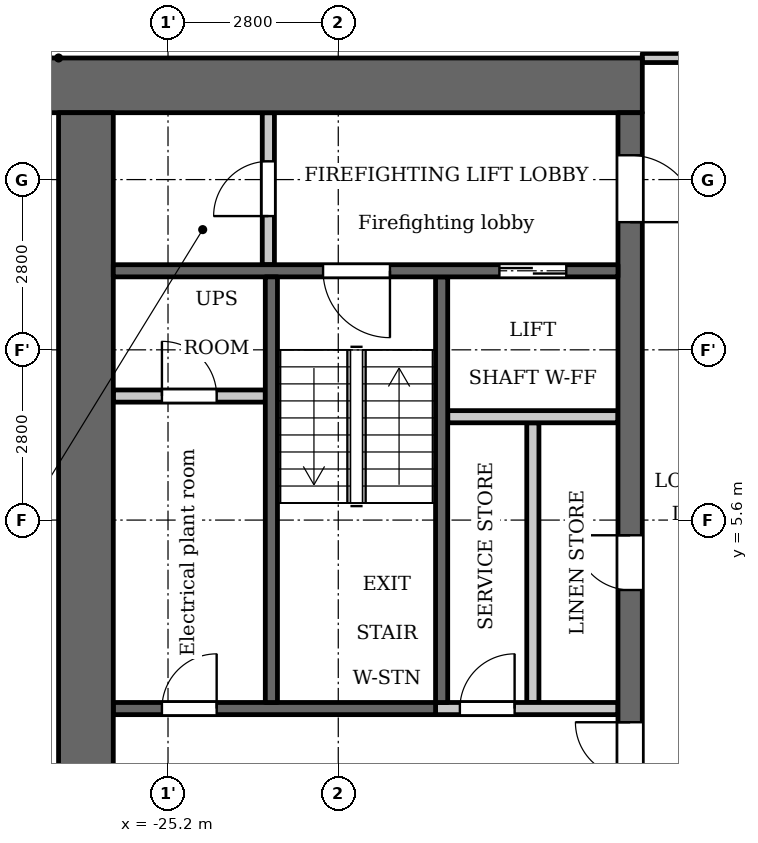
"""IFC4 building model, lengths in metres.
Left out: names, types, materials, properties, quantities, classifications, styles, units other than length and angle.
Written with IfcOpenShell. Run it as: python <this file> out.ifc"""

import sys

from ifc_helpers import new_model, si_unit, direction, frame, frame_2d, origin, place, context, subcontext, project, spatial, rectangle, extrude, element, fill, save


model = new_model("IFC4")
c1 = context("Model", 3, precision=1e-05, world=origin(), true_north=direction((0.0, 1.0)))
c2 = subcontext(c1, "Body", "Model", "MODEL_VIEW")
j1 = project(units=[si_unit("LENGTHUNIT", "METRE"), si_unit("PLANEANGLEUNIT", "RADIAN")], contexts=[c1])
p1 = place(None, origin())
s1 = spatial("IfcSite", under=j1, at=p1, CompositionType="ELEMENT")
p2 = place(p1, origin())
s2 = spatial("IfcBuilding", under=s1, at=p2, CompositionType="ELEMENT")
p3 = place(p2, frame((0.0, 0.0, 65.5)))
s3 = spatial("IfcBuildingStorey", under=s2, at=p3, CompositionType="ELEMENT", Elevation=65.5)
p4 = place(p3, frame((-20.7, 2.6, 0.0), z_axis=(0.0, 0.0, 1.0), x_axis=(0.0, 1.0, 0.0)))
e1 = element("IfcWall", 1, at=p4, inside=s3, PredefinedType="SHEAR", context=c2, shape_type="SweptSolid", body=[
    extrude(rectangle(XDim=7.0, YDim=0.2, at=frame_2d((3.5, 0.0))), origin(), (0.0, 0.0, 1.0), 3.2),
])
p5 = place(p3, frame((-20.8, 2.5, 0.0), z_axis=(0.0, 0.0, 1.0), x_axis=(-1.0, 0.0, 0.0)))
e2 = element("IfcWall", 2, at=p5, inside=s3, PredefinedType="SHEAR", context=c2, shape_type="SweptSolid", body=[
    extrude(rectangle(XDim=5.3, YDim=0.2, at=frame_2d((2.65, 0.0))), origin(), (0.0, 0.0, 1.0), 3.2),
])
p6 = place(p5, frame((3.6, 0.0, 0.0)))
e3 = element("IfcOpeningElement", 3, at=p6, cuts=e2, PredefinedType="OPENING", context=c2, shape_type="SweptSolid", body=[
    extrude(rectangle(XDim=0.9, YDim=2.1, at=frame_2d((0.45, 1.05))), frame((0.0, 0.11, 0.0), z_axis=(0.0, -1.0, 0.0), x_axis=(1.0, 0.0, 0.0)), (0.0, 0.0, 1.0), 0.22),
])
p7 = place(p3, frame((-17.4, 12.75, 0.0), z_axis=(0.0, 0.0, 1.0), x_axis=(-1.0, 0.0, 0.0)))
e4 = element("IfcWall", 4, at=p7, inside=s3, PredefinedType="SHEAR", context=c2, shape_type="SweptSolid", body=[
    extrude(rectangle(XDim=10.4, YDim=0.9, at=frame_2d((5.2, 0.0))), origin(), (0.0, 0.0, 1.0), 3.2),
])
p8 = place(p3, frame((-19.2, 2.6, 0.0), z_axis=(0.0, 0.0, 1.0), x_axis=(0.0, 1.0, 0.0)))
e5 = element("IfcWall", 5, at=p8, inside=s3, PredefinedType="PARTITIONING", context=c2, shape_type="SweptSolid", body=[
    extrude(rectangle(XDim=4.6, YDim=0.2, at=frame_2d((2.3, 0.0))), origin(), (0.0, 0.0, 1.0), 3.2),
])
p9 = place(p3, frame((-17.6, -12.3, 0.0), z_axis=(0.0, 0.0, 1.0), x_axis=(0.0, 1.0, 0.0)))
e6 = element("IfcWall", 6, at=p9, inside=s3, PredefinedType="SHEAR", context=c2, shape_type="SweptSolid", body=[
    extrude(rectangle(XDim=24.6, YDim=0.4, at=frame_2d((12.3, 0.0))), origin(), (0.0, 0.0, 1.0), 3.2),
])
p10 = place(p9, frame((6.0, 0.0, 0.0)))
e7 = element("IfcOpeningElement", 7, at=p10, cuts=e6, PredefinedType="OPENING", context=c2, shape_type="SweptSolid", body=[
    extrude(rectangle(XDim=1.1, YDim=2.1, at=frame_2d((0.55, 1.05))), frame((0.0, 0.21, 0.0), z_axis=(0.0, -1.0, 0.0), x_axis=(1.0, 0.0, 0.0)), (0.0, 0.0, 1.0), 0.42),
])
p11 = place(p9, frame((8.4, 0.0, 0.0)))
e8 = element("IfcOpeningElement", 8, at=p11, cuts=e6, PredefinedType="OPENING", context=c2, shape_type="SweptSolid", body=[
    extrude(rectangle(XDim=1.1, YDim=2.1, at=frame_2d((0.55, 1.05))), frame((0.0, 0.21, 0.0), z_axis=(0.0, -1.0, 0.0), x_axis=(1.0, 0.0, 0.0)), (0.0, 0.0, 1.0), 0.42),
])
p12 = place(p9, frame((10.8, 0.0, 0.0)))
e9 = element("IfcOpeningElement", 9, at=p12, cuts=e6, PredefinedType="OPENING", context=c2, shape_type="SweptSolid", body=[
    extrude(rectangle(XDim=1.1, YDim=2.1, at=frame_2d((0.55, 1.05))), frame((0.0, 0.21, 0.0), z_axis=(0.0, -1.0, 0.0), x_axis=(1.0, 0.0, 0.0)), (0.0, 0.0, 1.0), 0.42),
])
p13 = place(p9, frame((16.75, 0.0, 0.0)))
e10 = element("IfcOpeningElement", 10, at=p13, cuts=e6, PredefinedType="OPENING", context=c2, shape_type="SweptSolid", body=[
    extrude(rectangle(XDim=0.9, YDim=2.1, at=frame_2d((0.45, 1.05))), frame((0.0, 0.21, 0.0), z_axis=(0.0, -1.0, 0.0), x_axis=(1.0, 0.0, 0.0)), (0.0, 0.0, 1.0), 0.42),
])
p14 = place(p9, frame((22.8, 0.0, 0.0)))
e11 = element("IfcOpeningElement", 11, at=p14, cuts=e6, PredefinedType="OPENING", context=c2, shape_type="SweptSolid", body=[
    extrude(rectangle(XDim=1.1, YDim=2.1, at=frame_2d((0.55, 1.05))), frame((0.0, 0.21, 0.0), z_axis=(0.0, -1.0, 0.0), x_axis=(1.0, 0.0, 0.0)), (0.0, 0.0, 1.0), 0.42),
])
p15 = place(p9, frame((0.7, 0.0, 0.0)))
e12 = element("IfcOpeningElement", 12, at=p15, cuts=e6, PredefinedType="OPENING", context=c2, shape_type="SweptSolid", body=[
    extrude(rectangle(XDim=1.1, YDim=2.1, at=frame_2d((0.55, 1.05))), frame((0.0, 0.21, 0.0), z_axis=(0.0, -1.0, 0.0), x_axis=(1.0, 0.0, 0.0)), (0.0, 0.0, 1.0), 0.42),
])
p16 = place(p9, frame((12.775, 0.0, 0.0)))
e13 = element("IfcOpeningElement", 13, at=p16, cuts=e6, PredefinedType="OPENING", context=c2, shape_type="SweptSolid", body=[
    extrude(rectangle(XDim=1.8, YDim=2.1, at=frame_2d((0.9, 1.05))), frame((0.0, 0.21, 0.0), z_axis=(0.0, -1.0, 0.0), x_axis=(1.0, 0.0, 0.0)), (0.0, 0.0, 1.0), 0.42),
])
p17 = place(p3, frame((-26.55, -12.3, 0.0), z_axis=(0.0, 0.0, 1.0), x_axis=(0.0, 1.0, 0.0)))
e14 = element("IfcWall", 14, at=p17, inside=s3, PredefinedType="SHEAR", context=c2, shape_type="SweptSolid", body=[
    extrude(rectangle(XDim=24.6, YDim=0.9, at=frame_2d((12.3, 0.0))), origin(), (0.0, 0.0, 1.0), 3.2),
])
p18 = place(p3, frame((-23.55, 9.8, 0.0), z_axis=(0.0, 0.0, 1.0), x_axis=(0.0, 1.0, 0.0)))
e15 = element("IfcWall", 15, at=p18, inside=s3, PredefinedType="PARTITIONING", context=c2, shape_type="SweptSolid", body=[
    extrude(rectangle(XDim=2.5, YDim=0.2, at=frame_2d((1.25, 0.0))), origin(), (0.0, 0.0, 1.0), 3.2),
])
p19 = place(p18, frame((0.8, 0.0, 0.0)))
e16 = element("IfcOpeningElement", 16, at=p19, cuts=e15, PredefinedType="OPENING", context=c2, shape_type="SweptSolid", body=[
    extrude(rectangle(XDim=0.9, YDim=2.1, at=frame_2d((0.45, 1.05))), frame((0.0, 0.11, 0.0), z_axis=(0.0, -1.0, 0.0), x_axis=(1.0, 0.0, 0.0)), (0.0, 0.0, 1.0), 0.22),
])
p20 = place(p3, frame((-23.6, 7.64, 0.0), z_axis=(0.0, 0.0, 1.0), x_axis=(-1.0, 0.0, 0.0)))
e17 = element("IfcWall", 17, at=p20, inside=s3, PredefinedType="PARTITIONING", context=c2, shape_type="SweptSolid", body=[
    extrude(rectangle(XDim=2.5, YDim=0.2, at=frame_2d((1.25, 0.0))), origin(), (0.0, 0.0, 1.0), 3.2),
])
p21 = place(p20, frame((0.8, 0.0, 0.0)))
e18 = element("IfcOpeningElement", 18, at=p21, cuts=e17, PredefinedType="OPENING", context=c2, shape_type="SweptSolid", body=[
    extrude(rectangle(XDim=0.9, YDim=2.1, at=frame_2d((0.45, 1.05))), frame((0.0, 0.11, 0.0), z_axis=(0.0, -1.0, 0.0), x_axis=(1.0, 0.0, 0.0)), (0.0, 0.0, 1.0), 0.22),
])
p22 = place(p3, frame((-17.8, 2.5, 0.0), z_axis=(0.0, 0.0, 1.0), x_axis=(-1.0, 0.0, 0.0)))
e19 = element("IfcWall", 19, at=p22, inside=s3, PredefinedType="PARTITIONING", context=c2, shape_type="SweptSolid", body=[
    extrude(rectangle(XDim=3.0, YDim=0.2, at=frame_2d((1.5, 0.0))), origin(), (0.0, 0.0, 1.0), 3.2),
])
p23 = place(p22, frame((1.7, 0.0, 0.0)))
e20 = element("IfcOpeningElement", 20, at=p23, cuts=e19, PredefinedType="OPENING", context=c2, shape_type="SweptSolid", body=[
    extrude(rectangle(XDim=0.9, YDim=2.1, at=frame_2d((0.45, 1.05))), frame((0.0, 0.11, 0.0), z_axis=(0.0, -1.0, 0.0), x_axis=(1.0, 0.0, 0.0)), (0.0, 0.0, 1.0), 0.22),
])
p24 = place(p3, frame((-17.8, 7.3, 0.0), z_axis=(0.0, 0.0, 1.0), x_axis=(-1.0, 0.0, 0.0)))
e21 = element("IfcWall", 21, at=p24, inside=s3, PredefinedType="PARTITIONING", context=c2, shape_type="SweptSolid", body=[
    extrude(rectangle(XDim=2.8, YDim=0.2, at=frame_2d((1.4, 0.0))), origin(), (0.0, 0.0, 1.0), 3.2),
])
p25 = place(p3, frame((-17.8, 9.7, 0.0), z_axis=(0.0, 0.0, 1.0), x_axis=(-1.0, 0.0, 0.0)))
e22 = element("IfcWall", 22, at=p25, inside=s3, PredefinedType="SHEAR", context=c2, shape_type="SweptSolid", body=[
    extrude(rectangle(XDim=8.3, YDim=0.2, at=frame_2d((4.15, 0.0))), origin(), (0.0, 0.0, 1.0), 3.2),
])
p26 = place(p25, frame((0.85, 0.0, 0.0)))
e23 = element("IfcOpeningElement", 23, at=p26, cuts=e22, PredefinedType="OPENING", context=c2, shape_type="SweptSolid", body=[
    extrude(rectangle(XDim=1.1, YDim=2.1, at=frame_2d((0.55, 1.05))), frame((0.0, 0.11, 0.0), z_axis=(0.0, -1.0, 0.0), x_axis=(1.0, 0.0, 0.0)), (0.0, 0.0, 1.0), 0.22),
])
p27 = place(p25, frame((3.75, 0.0, 0.0)))
e24 = element("IfcOpeningElement", 24, at=p27, cuts=e22, PredefinedType="OPENING", context=c2, shape_type="SweptSolid", body=[
    extrude(rectangle(XDim=1.1, YDim=2.1, at=frame_2d((0.55, 1.05))), frame((0.0, 0.11, 0.0), z_axis=(0.0, -1.0, 0.0), x_axis=(1.0, 0.0, 0.0)), (0.0, 0.0, 1.0), 0.22),
])
p28 = place(p3, frame((-23.5, 2.6, 0.0), z_axis=(0.0, 0.0, 1.0), x_axis=(0.0, 1.0, 0.0)))
e25 = element("IfcWall", 25, at=p28, inside=s3, PredefinedType="SHEAR", context=c2, shape_type="SweptSolid", body=[
    extrude(rectangle(XDim=7.0, YDim=0.2, at=frame_2d((3.5, 0.0))), origin(), (0.0, 0.0, 1.0), 3.2),
])
p29 = place(p3, frame((-17.4, 13.2, 0.0), z_axis=(0.0, 0.0, 1.0), x_axis=(1.0, 0.0, 0.0)))
e26 = element("IfcWall", 26, at=p29, inside=s3, PredefinedType="PARTITIONING", context=c2, shape_type="SweptSolid", body=[
    extrude(rectangle(XDim=34.8, YDim=0.15, at=frame_2d((17.4, 0.0))), origin(), (0.0, 0.0, 1.0), 3.2),
])
p30 = place(p29, frame((0.75, 0.0, 0.0)))
e27 = element("IfcOpeningElement", 27, at=p30, cuts=e26, PredefinedType="OPENING", context=c2, shape_type="SweptSolid", body=[
    extrude(rectangle(XDim=1.0, YDim=2.1, at=frame_2d((0.5, 1.05))), frame((0.0, 0.085, 0.0), z_axis=(0.0, -1.0, 0.0), x_axis=(1.0, 0.0, 0.0)), (0.0, 0.0, 1.0), 0.17),
])
p31 = place(p29, frame((33.15, 0.0, 0.0)))
e28 = element("IfcOpeningElement", 28, at=p31, cuts=e26, PredefinedType="OPENING", context=c2, shape_type="SweptSolid", body=[
    extrude(rectangle(XDim=1.0, YDim=2.1, at=frame_2d((0.5, 1.05))), frame((0.0, 0.085, 0.0), z_axis=(0.0, -1.0, 0.0), x_axis=(1.0, 0.0, 0.0)), (0.0, 0.0, 1.0), 0.17),
])
p32 = place(p29, frame((6.85, 0.0, 0.0)))
e29 = element("IfcOpeningElement", 29, at=p32, cuts=e26, PredefinedType="OPENING", context=c2, shape_type="SweptSolid", body=[
    extrude(rectangle(XDim=1.0, YDim=2.1, at=frame_2d((0.5, 1.05))), frame((0.0, 0.085, 0.0), z_axis=(0.0, -1.0, 0.0), x_axis=(1.0, 0.0, 0.0)), (0.0, 0.0, 1.0), 0.17),
])
p33 = place(p29, frame((12.45, 0.0, 0.0)))
e30 = element("IfcOpeningElement", 30, at=p33, cuts=e26, PredefinedType="OPENING", context=c2, shape_type="SweptSolid", body=[
    extrude(rectangle(XDim=1.0, YDim=2.1, at=frame_2d((0.5, 1.05))), frame((0.0, 0.085, 0.0), z_axis=(0.0, -1.0, 0.0), x_axis=(1.0, 0.0, 0.0)), (0.0, 0.0, 1.0), 0.17),
])
p34 = place(p29, frame((23.65, 0.0, 0.0)))
e31 = element("IfcOpeningElement", 31, at=p34, cuts=e26, PredefinedType="OPENING", context=c2, shape_type="SweptSolid", body=[
    extrude(rectangle(XDim=1.0, YDim=2.1, at=frame_2d((0.5, 1.05))), frame((0.0, 0.085, 0.0), z_axis=(0.0, -1.0, 0.0), x_axis=(1.0, 0.0, 0.0)), (0.0, 0.0, 1.0), 0.17),
])
p35 = place(p13, origin())
e32 = element("IfcDoor", 32, at=p35, inside=s3, OperationType="SINGLE_SWING_LEFT", PredefinedType="DOOR", context=c2, shape_type="SweptSolid", body=[
    extrude(rectangle(XDim=0.9, YDim=2.1, at=frame_2d((0.45, 1.05))), frame((0.0, 0.025, 0.0), z_axis=(0.0, -1.0, 0.0), x_axis=(1.0, 0.0, 0.0)), (0.0, 0.0, 1.0), 0.05),
])
fill(e10, e32)
p36 = place(p23, origin())
e33 = element("IfcDoor", 33, at=p36, inside=s3, OperationType="SINGLE_SWING_LEFT", PredefinedType="DOOR", context=c2, shape_type="SweptSolid", body=[
    extrude(rectangle(XDim=0.9, YDim=2.1, at=frame_2d((0.45, 1.05))), frame((0.0, 0.025, 0.0), z_axis=(0.0, -1.0, 0.0), x_axis=(1.0, 0.0, 0.0)), (0.0, 0.0, 1.0), 0.05),
])
fill(e20, e33)
p37 = place(p26, origin())
e34 = element("IfcDoor", 34, at=p37, inside=s3, OperationType="DOUBLE_DOOR_SLIDING", PredefinedType="DOOR", context=c2, shape_type="SweptSolid", body=[
    extrude(rectangle(XDim=1.1, YDim=2.1, at=frame_2d((0.55, 1.05))), frame((0.0, 0.025, 0.0), z_axis=(0.0, -1.0, 0.0), x_axis=(1.0, 0.0, 0.0)), (0.0, 0.0, 1.0), 0.05),
])
fill(e23, e34)
p38 = place(p14, origin())
e35 = element("IfcDoor", 35, at=p38, inside=s3, OperationType="SINGLE_SWING_LEFT", PredefinedType="DOOR", context=c2, shape_type="SweptSolid", body=[
    extrude(rectangle(XDim=1.1, YDim=2.1, at=frame_2d((0.55, 1.05))), frame((0.0, 0.025, 0.0), z_axis=(0.0, -1.0, 0.0), x_axis=(1.0, 0.0, 0.0)), (0.0, 0.0, 1.0), 0.05),
])
fill(e11, e35)
p39 = place(p19, origin())
e36 = element("IfcDoor", 36, at=p39, inside=s3, OperationType="SINGLE_SWING_RIGHT", PredefinedType="DOOR", context=c2, shape_type="SweptSolid", body=[
    extrude(rectangle(XDim=0.9, YDim=2.1, at=frame_2d((0.45, 1.05))), frame((0.0, 0.025, 0.0), z_axis=(0.0, -1.0, 0.0), x_axis=(1.0, 0.0, 0.0)), (0.0, 0.0, 1.0), 0.05),
])
fill(e16, e36)
p40 = place(p27, origin())
e37 = element("IfcDoor", 37, at=p40, inside=s3, OperationType="SINGLE_SWING_RIGHT", PredefinedType="DOOR", context=c2, shape_type="SweptSolid", body=[
    extrude(rectangle(XDim=1.1, YDim=2.1, at=frame_2d((0.55, 1.05))), frame((0.0, 0.025, 0.0), z_axis=(0.0, -1.0, 0.0), x_axis=(1.0, 0.0, 0.0)), (0.0, 0.0, 1.0), 0.05),
])
fill(e24, e37)
p41 = place(p16, origin())
e38 = element("IfcDoor", 38, at=p41, inside=s3, OperationType="DOUBLE_DOOR_SINGLE_SWING", PredefinedType="DOOR", context=c2, shape_type="SweptSolid", body=[
    extrude(rectangle(XDim=1.8, YDim=2.1, at=frame_2d((0.9, 1.05))), frame((0.0, 0.025, 0.0), z_axis=(0.0, -1.0, 0.0), x_axis=(1.0, 0.0, 0.0)), (0.0, 0.0, 1.0), 0.05),
])
fill(e13, e38)
p42 = place(p21, origin())
e39 = element("IfcDoor", 39, at=p42, inside=s3, OperationType="SINGLE_SWING_RIGHT", PredefinedType="DOOR", context=c2, shape_type="SweptSolid", body=[
    extrude(rectangle(XDim=0.9, YDim=2.1, at=frame_2d((0.45, 1.05))), frame((0.0, 0.025, 0.0), z_axis=(0.0, -1.0, 0.0), x_axis=(1.0, 0.0, 0.0)), (0.0, 0.0, 1.0), 0.05),
])
fill(e18, e39)
p43 = place(p6, origin())
e40 = element("IfcDoor", 40, at=p43, inside=s3, OperationType="SINGLE_SWING_LEFT", PredefinedType="DOOR", context=c2, shape_type="SweptSolid", body=[
    extrude(rectangle(XDim=0.9, YDim=2.1, at=frame_2d((0.45, 1.05))), frame((0.0, 0.025, 0.0), z_axis=(0.0, -1.0, 0.0), x_axis=(1.0, 0.0, 0.0)), (0.0, 0.0, 1.0), 0.05),
])
fill(e3, e40)
save(model, sys.argv[1])
